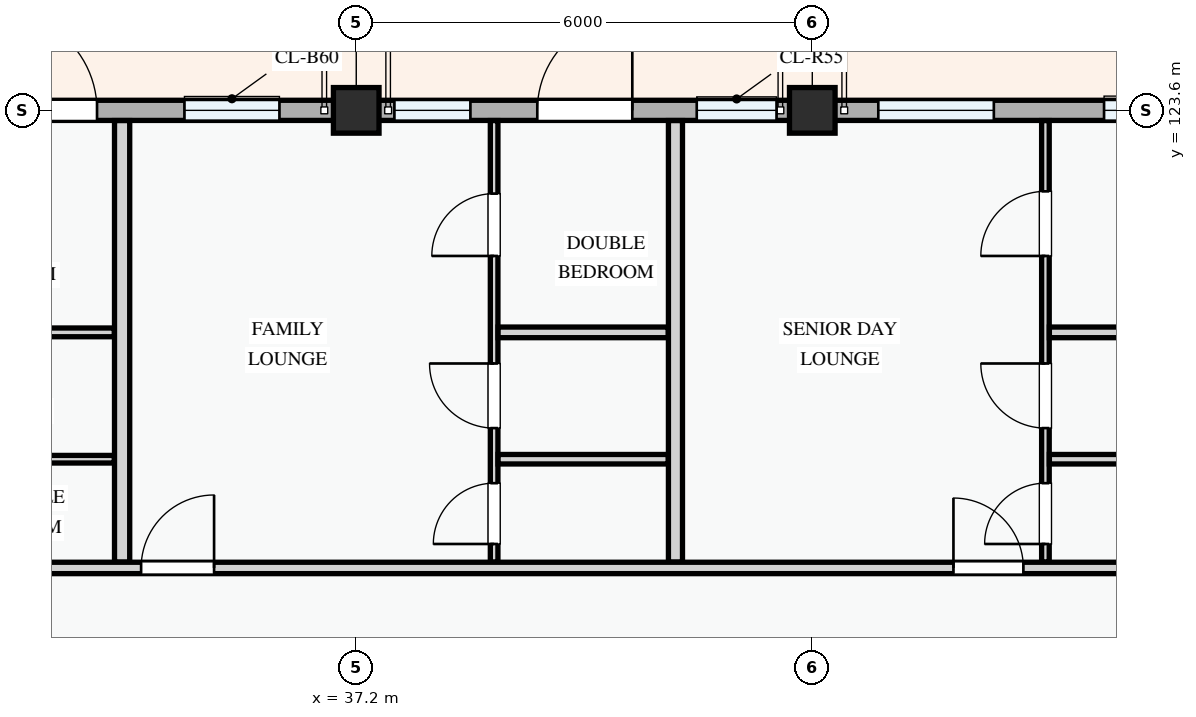
"""IFC4 building model, lengths in metres.
Left out: names, types, materials, properties, quantities, classifications, styles, units other than length and angle.
Written with IfcOpenShell. Run it as: python <this file> out.ifc"""

import sys

from ifc_helpers import new_model, si_unit, direction, frame, frame_2d, origin, origin_2d, place, context, subcontext, project, spatial, rectangle, extrude, element, fill, save


model = new_model("IFC4")
c1 = context("Model", 3, precision=1e-05, world=origin(), true_north=direction((0.0, 1.0)))
c2 = subcontext(c1, "Body", "Model", "MODEL_VIEW")
j1 = project(units=[si_unit("LENGTHUNIT", "METRE"), si_unit("PLANEANGLEUNIT", "RADIAN")], contexts=[c1])
p1 = place(None, origin())
s1 = spatial("IfcSite", under=j1, at=p1, CompositionType="ELEMENT")
p2 = place(p1, origin())
s2 = spatial("IfcBuilding", under=s1, at=p2, CompositionType="ELEMENT")
p3 = place(p2, frame((0.0, 0.0, 34.5)))
s3 = spatial("IfcBuildingStorey", under=s2, at=p3, CompositionType="ELEMENT", Elevation=34.5)
for number, where, z_axis, x_axis in (
    (1, (37.2, 123.6, 0.0), (0.0, 0.0, 1.0), (1.0, 0.0, 0.0)),
    (2, (43.2, 123.6, 0.0), (0.0, 0.0, 1.0), (1.0, 0.0, 0.0)),
):
    element("IfcColumn", number, at=place(p3, frame(where, z_axis=z_axis, x_axis=x_axis)), inside=s3, PredefinedType="COLUMN", context=c2, shape_type="SweptSolid", body=[
        extrude(rectangle(XDim=0.6, YDim=0.6, at=origin_2d()), origin(), (0.0, 0.0, 1.0), 3.3),
    ])
p4 = place(p3, frame((51.6, 123.6, 0.0), z_axis=(0.0, 0.0, 1.0), x_axis=(-1.0, 0.0, 0.0)))
e3 = element("IfcWall", 3, at=p4, inside=s3, PredefinedType="STANDARD", context=c2, shape_type="SweptSolid", body=[
    extrude(rectangle(XDim=8.4, YDim=0.265, at=frame_2d((4.2, 0.0))), origin(), (0.0, 0.0, 1.0), 2.345),
])
p5 = place(p4, frame((0.62, 0.0, 0.0)))
e4 = element("IfcOpeningElement", 4, at=p5, cuts=e3, PredefinedType="OPENING", context=c2, shape_type="SweptSolid", body=[
    extrude(rectangle(XDim=1.2, YDim=2.15, at=frame_2d((0.6, 1.075))), frame((0.0, 0.143, 0.0), z_axis=(0.0, -1.0, 0.0), x_axis=(1.0, 0.0, 0.0)), (0.0, 0.0, 1.0), 0.285),
])
p6 = place(p4, frame((2.641, 0.0, 0.78)))
e5 = element("IfcOpeningElement", 5, at=p6, cuts=e3, PredefinedType="OPENING", context=c2, shape_type="SweptSolid", body=[
    extrude(rectangle(XDim=1.92, YDim=1.44, at=frame_2d((0.96, 0.72))), frame((0.0, 0.143, 0.0), z_axis=(0.0, -1.0, 0.0), x_axis=(1.0, 0.0, 0.0)), (0.0, 0.0, 1.0), 0.285),
])
p7 = place(p4, frame((6.011, 0.0, 0.78)))
e6 = element("IfcOpeningElement", 6, at=p7, cuts=e3, PredefinedType="OPENING", context=c2, shape_type="SweptSolid", body=[
    extrude(rectangle(XDim=1.52, YDim=1.42, at=frame_2d((0.76, 0.71))), frame((0.0, 0.143, 0.0), z_axis=(0.0, -1.0, 0.0), x_axis=(1.0, 0.0, 0.0)), (0.0, 0.0, 1.0), 0.285),
])
p8 = place(p3, frame((43.2, 123.6, 0.0), z_axis=(0.0, 0.0, 1.0), x_axis=(-1.0, 0.0, 0.0)))
e7 = element("IfcWall", 7, at=p8, inside=s3, PredefinedType="STANDARD", context=c2, shape_type="SweptSolid", body=[
    extrude(rectangle(XDim=6.0, YDim=0.265, at=frame_2d((3.0, 0.0))), origin(), (0.0, 0.0, 1.0), 2.445),
])
p9 = place(p8, frame((2.368, 0.0, 0.0)))
e8 = element("IfcOpeningElement", 8, at=p9, cuts=e7, PredefinedType="OPENING", context=c2, shape_type="SweptSolid", body=[
    extrude(rectangle(XDim=1.25, YDim=2.2, at=frame_2d((0.625, 1.1))), frame((0.0, 0.143, 0.0), z_axis=(0.0, -1.0, 0.0), x_axis=(1.0, 0.0, 0.0)), (0.0, 0.0, 1.0), 0.285),
])
p10 = place(p8, frame((0.47, 0.0, 0.78)))
e9 = element("IfcOpeningElement", 9, at=p10, cuts=e7, PredefinedType="OPENING", context=c2, shape_type="SweptSolid", body=[
    extrude(rectangle(XDim=1.05, YDim=1.2, at=frame_2d((0.525, 0.6))), frame((0.0, 0.143, 0.0), z_axis=(0.0, -1.0, 0.0), x_axis=(1.0, 0.0, 0.0)), (0.0, 0.0, 1.0), 0.285),
])
p11 = place(p8, frame((4.498, 0.0, 0.78)))
e10 = element("IfcOpeningElement", 10, at=p11, cuts=e7, PredefinedType="OPENING", context=c2, shape_type="SweptSolid", body=[
    extrude(rectangle(XDim=1.0, YDim=1.25, at=frame_2d((0.5, 0.625))), frame((0.0, 0.143, 0.0), z_axis=(0.0, -1.0, 0.0), x_axis=(1.0, 0.0, 0.0)), (0.0, 0.0, 1.0), 0.285),
])
p12 = place(p3, frame((37.2, 123.6, 0.0), z_axis=(0.0, 0.0, 1.0), x_axis=(-1.0, 0.0, 0.0)))
e11 = element("IfcWall", 11, at=p12, inside=s3, PredefinedType="STANDARD", context=c2, shape_type="SweptSolid", body=[
    extrude(rectangle(XDim=8.4, YDim=0.265, at=frame_2d((4.2, 0.0))), origin(), (0.0, 0.0, 1.0), 2.345),
])
p13 = place(p12, frame((3.41, 0.0, 0.0)))
e12 = element("IfcOpeningElement", 12, at=p13, cuts=e11, PredefinedType="OPENING", context=c2, shape_type="SweptSolid", body=[
    extrude(rectangle(XDim=1.3, YDim=2.15, at=frame_2d((0.65, 1.075))), frame((0.0, 0.143, 0.0), z_axis=(0.0, -1.0, 0.0), x_axis=(1.0, 0.0, 0.0)), (0.0, 0.0, 1.0), 0.285),
])
p14 = place(p12, frame((1.01, 0.0, 0.78)))
e13 = element("IfcOpeningElement", 13, at=p14, cuts=e11, PredefinedType="OPENING", context=c2, shape_type="SweptSolid", body=[
    extrude(rectangle(XDim=1.25, YDim=1.45, at=frame_2d((0.625, 0.725))), frame((0.0, 0.143, 0.0), z_axis=(0.0, -1.0, 0.0), x_axis=(1.0, 0.0, 0.0)), (0.0, 0.0, 1.0), 0.285),
])
p15 = place(p12, frame((5.077, 0.0, 0.78)))
e14 = element("IfcOpeningElement", 14, at=p15, cuts=e11, PredefinedType="OPENING", context=c2, shape_type="SweptSolid", body=[
    extrude(rectangle(XDim=1.25, YDim=1.3, at=frame_2d((0.625, 0.65))), frame((0.0, 0.143, 0.0), z_axis=(0.0, -1.0, 0.0), x_axis=(1.0, 0.0, 0.0)), (0.0, 0.0, 1.0), 0.285),
])
p16 = place(p12, frame((6.927, 0.0, 0.78)))
e15 = element("IfcOpeningElement", 15, at=p16, cuts=e11, PredefinedType="OPENING", context=c2, shape_type="SweptSolid", body=[
    extrude(rectangle(XDim=1.0, YDim=1.25, at=frame_2d((0.5, 0.625))), frame((0.0, 0.143, 0.0), z_axis=(0.0, -1.0, 0.0), x_axis=(1.0, 0.0, 0.0)), (0.0, 0.0, 1.0), 0.285),
])
p17 = place(p3, frame((30.62, 120.679, 0.0), z_axis=(0.0, 0.0, 1.0), x_axis=(1.0, 0.0, 0.0)))
e16 = element("IfcWall", 16, at=p17, inside=s3, PredefinedType="PARTITIONING", context=c2, shape_type="SweptSolid", body=[
    extrude(rectangle(XDim=3.398, YDim=0.115, at=frame_2d((1.699, 0.0))), origin(), (0.0, 0.0, 1.0), 3.0),
])
p18 = place(p3, frame((30.62, 119.01, 0.0), z_axis=(0.0, 0.0, 1.0), x_axis=(1.0, 0.0, 0.0)))
e17 = element("IfcWall", 17, at=p18, inside=s3, PredefinedType="PARTITIONING", context=c2, shape_type="SweptSolid", body=[
    extrude(rectangle(XDim=3.398, YDim=0.1, at=frame_2d((1.699, 0.0))), origin(), (0.0, 0.0, 1.0), 3.0),
])
p19 = place(p3, frame((39.014, 117.657, 0.0), z_axis=(0.0, 0.0, 1.0), x_axis=(0.0, 1.0, 0.0)))
e18 = element("IfcWall", 18, at=p19, inside=s3, PredefinedType="PARTITIONING", context=c2, shape_type="SweptSolid", body=[
    extrude(rectangle(XDim=5.809, YDim=0.1, at=frame_2d((2.904, 0.0))), origin(), (0.0, 0.0, 1.0), 3.0),
])
p20 = place(p19, frame((0.238, 0.0, 0.0)))
e19 = element("IfcOpeningElement", 19, at=p20, cuts=e18, PredefinedType="OPENING", context=c2, shape_type="SweptSolid", body=[
    extrude(rectangle(XDim=0.8, YDim=2.1, at=frame_2d((0.4, 1.05))), frame((0.0, 0.06, 0.0), z_axis=(0.0, -1.0, 0.0), x_axis=(1.0, 0.0, 0.0)), (0.0, 0.0, 1.0), 0.12),
])
p21 = place(p19, frame((1.763, 0.0, 0.0)))
e20 = element("IfcOpeningElement", 20, at=p21, cuts=e18, PredefinedType="OPENING", context=c2, shape_type="SweptSolid", body=[
    extrude(rectangle(XDim=0.85, YDim=2.1, at=frame_2d((0.425, 1.05))), frame((0.0, 0.06, 0.0), z_axis=(0.0, -1.0, 0.0), x_axis=(1.0, 0.0, 0.0)), (0.0, 0.0, 1.0), 0.12),
])
p22 = place(p19, frame((4.028, 0.0, 0.0)))
e21 = element("IfcOpeningElement", 21, at=p22, cuts=e18, PredefinedType="OPENING", context=c2, shape_type="SweptSolid", body=[
    extrude(rectangle(XDim=0.82, YDim=2.08, at=frame_2d((0.41, 1.04))), frame((0.0, 0.06, 0.0), z_axis=(0.0, -1.0, 0.0), x_axis=(1.0, 0.0, 0.0)), (0.0, 0.0, 1.0), 0.12),
])
p23 = place(p3, frame((39.066, 120.679, 0.0), z_axis=(0.0, 0.0, 1.0), x_axis=(1.0, 0.0, 0.0)))
e22 = element("IfcWall", 22, at=p23, inside=s3, PredefinedType="PARTITIONING", context=c2, shape_type="SweptSolid", body=[
    extrude(rectangle(XDim=2.239, YDim=0.14, at=frame_2d((1.12, 0.0))), origin(), (0.0, 0.0, 1.0), 3.0),
])
p24 = place(p3, frame((39.066, 119.01, 0.0), z_axis=(0.0, 0.0, 1.0), x_axis=(1.0, 0.0, 0.0)))
e23 = element("IfcWall", 23, at=p24, inside=s3, PredefinedType="PARTITIONING", context=c2, shape_type="SweptSolid", body=[
    extrude(rectangle(XDim=2.239, YDim=0.125, at=frame_2d((1.12, 0.0))), origin(), (0.0, 0.0, 1.0), 3.0),
])
p25 = place(p3, frame((34.12, 117.657, 0.0), z_axis=(0.0, 0.0, 1.0), x_axis=(0.0, 1.0, 0.0)))
e24 = element("IfcWall", 24, at=p25, inside=s3, PredefinedType="PARTITIONING", context=c2, shape_type="SweptSolid", body=[
    extrude(rectangle(XDim=5.809, YDim=0.2, at=frame_2d((2.904, 0.0))), origin(), (0.0, 0.0, 1.0), 3.0),
])
p26 = place(p3, frame((46.267, 117.657, 0.0), z_axis=(0.0, 0.0, 1.0), x_axis=(0.0, 1.0, 0.0)))
e25 = element("IfcWall", 25, at=p26, inside=s3, PredefinedType="PARTITIONING", context=c2, shape_type="SweptSolid", body=[
    extrude(rectangle(XDim=5.809, YDim=0.1, at=frame_2d((2.904, 0.0))), origin(), (0.0, 0.0, 1.0), 3.0),
])
p27 = place(p26, frame((0.238, 0.0, 0.0)))
e26 = element("IfcOpeningElement", 26, at=p27, cuts=e25, PredefinedType="OPENING", context=c2, shape_type="SweptSolid", body=[
    extrude(rectangle(XDim=0.8, YDim=2.1, at=frame_2d((0.4, 1.05))), frame((0.0, 0.06, 0.0), z_axis=(0.0, -1.0, 0.0), x_axis=(1.0, 0.0, 0.0)), (0.0, 0.0, 1.0), 0.12),
])
p28 = place(p26, frame((1.763, 0.0, 0.0)))
e27 = element("IfcOpeningElement", 27, at=p28, cuts=e25, PredefinedType="OPENING", context=c2, shape_type="SweptSolid", body=[
    extrude(rectangle(XDim=0.85, YDim=2.1, at=frame_2d((0.425, 1.05))), frame((0.0, 0.06, 0.0), z_axis=(0.0, -1.0, 0.0), x_axis=(1.0, 0.0, 0.0)), (0.0, 0.0, 1.0), 0.12),
])
p29 = place(p26, frame((4.028, 0.0, 0.0)))
e28 = element("IfcOpeningElement", 28, at=p29, cuts=e25, PredefinedType="OPENING", context=c2, shape_type="SweptSolid", body=[
    extrude(rectangle(XDim=0.85, YDim=2.1, at=frame_2d((0.425, 1.05))), frame((0.0, 0.06, 0.0), z_axis=(0.0, -1.0, 0.0), x_axis=(1.0, 0.0, 0.0)), (0.0, 0.0, 1.0), 0.12),
])
p30 = place(p3, frame((46.319, 120.679, 0.0), z_axis=(0.0, 0.0, 1.0), x_axis=(1.0, 0.0, 0.0)))
e29 = element("IfcWall", 29, at=p30, inside=s3, PredefinedType="PARTITIONING", context=c2, shape_type="SweptSolid", body=[
    extrude(rectangle(XDim=5.146, YDim=0.14, at=frame_2d((2.573, 0.0))), origin(), (0.0, 0.0, 1.0), 3.0),
])
p31 = place(p3, frame((46.319, 119.01, 0.0), z_axis=(0.0, 0.0, 1.0), x_axis=(1.0, 0.0, 0.0)))
e30 = element("IfcWall", 30, at=p31, inside=s3, PredefinedType="PARTITIONING", context=c2, shape_type="SweptSolid", body=[
    extrude(rectangle(XDim=5.146, YDim=0.125, at=frame_2d((2.573, 0.0))), origin(), (0.0, 0.0, 1.0), 3.0),
])
p32 = place(p3, frame((41.4, 117.657, 0.0), z_axis=(0.0, 0.0, 1.0), x_axis=(0.0, 1.0, 0.0)))
e31 = element("IfcWall", 31, at=p32, inside=s3, PredefinedType="PARTITIONING", context=c2, shape_type="SweptSolid", body=[
    extrude(rectangle(XDim=5.809, YDim=0.185, at=frame_2d((2.904, 0.0))), origin(), (0.0, 0.0, 1.0), 3.0),
])
p33 = place(p3, frame((22.66, 117.58, 0.0), z_axis=(0.0, 0.0, 1.0), x_axis=(1.0, 0.0, 0.0)))
e32 = element("IfcWall", 32, at=p33, inside=s3, PredefinedType="PARTITIONING", context=c2, shape_type="SweptSolid", body=[
    extrude(rectangle(XDim=28.806, YDim=0.15, at=frame_2d((14.403, 0.0))), origin(), (0.0, 0.0, 1.0), 3.0),
])
p34 = place(p33, frame((2.74, 0.0, 0.0)))
e33 = element("IfcOpeningElement", 33, at=p34, cuts=e32, PredefinedType="OPENING", context=c2, shape_type="SweptSolid", body=[
    extrude(rectangle(XDim=0.92, YDim=2.1, at=frame_2d((0.46, 1.05))), frame((0.0, 0.085, 0.0), z_axis=(0.0, -1.0, 0.0), x_axis=(1.0, 0.0, 0.0)), (0.0, 0.0, 1.0), 0.17),
])
p35 = place(p33, frame((11.71, 0.0, 0.0)))
e34 = element("IfcOpeningElement", 34, at=p35, cuts=e32, PredefinedType="OPENING", context=c2, shape_type="SweptSolid", body=[
    extrude(rectangle(XDim=0.96, YDim=2.12, at=frame_2d((0.48, 1.06))), frame((0.0, 0.085, 0.0), z_axis=(0.0, -1.0, 0.0), x_axis=(1.0, 0.0, 0.0)), (0.0, 0.0, 1.0), 0.17),
])
p36 = place(p33, frame((22.397, 0.0, 0.0)))
e35 = element("IfcOpeningElement", 35, at=p36, cuts=e32, PredefinedType="OPENING", context=c2, shape_type="SweptSolid", body=[
    extrude(rectangle(XDim=0.92, YDim=2.1, at=frame_2d((0.46, 1.05))), frame((0.0, 0.085, 0.0), z_axis=(0.0, -1.0, 0.0), x_axis=(1.0, 0.0, 0.0)), (0.0, 0.0, 1.0), 0.17),
])
p37 = place(p6, origin())
e36 = element("IfcWindow", 36, at=p37, inside=s3, PartitioningType="DOUBLE_PANEL_VERTICAL", PredefinedType="WINDOW", context=c2, shape_type="SweptSolid", body=[
    extrude(rectangle(XDim=1.92, YDim=1.44, at=frame_2d((0.96, 0.72))), frame((0.0, 0.03, 0.0), z_axis=(0.0, -1.0, 0.0), x_axis=(1.0, 0.0, 0.0)), (0.0, 0.0, 1.0), 0.06),
])
fill(e5, e36)
p38 = place(p7, origin())
e37 = element("IfcWindow", 37, at=p38, inside=s3, PartitioningType="SINGLE_PANEL", PredefinedType="WINDOW", context=c2, shape_type="SweptSolid", body=[
    extrude(rectangle(XDim=1.52, YDim=1.42, at=frame_2d((0.76, 0.71))), frame((0.0, 0.03, 0.0), z_axis=(0.0, -1.0, 0.0), x_axis=(1.0, 0.0, 0.0)), (0.0, 0.0, 1.0), 0.06),
])
fill(e6, e37)
p39 = place(p9, frame((1.25, 0.0, 0.0), z_axis=(0.0, 0.0, 1.0), x_axis=(-1.0, 0.0, 0.0)))
e38 = element("IfcDoor", 38, at=p39, inside=s3, OperationType="SINGLE_SWING_RIGHT", PredefinedType="DOOR", context=c2, shape_type="SweptSolid", body=[
    extrude(rectangle(XDim=1.25, YDim=2.2, at=frame_2d((0.625, 1.1))), frame((0.0, 0.025, 0.0), z_axis=(0.0, -1.0, 0.0), x_axis=(1.0, 0.0, 0.0)), (0.0, 0.0, 1.0), 0.05),
])
fill(e8, e38)
p40 = place(p10, origin())
e39 = element("IfcWindow", 39, at=p40, inside=s3, PartitioningType="SINGLE_PANEL", PredefinedType="WINDOW", context=c2, shape_type="SweptSolid", body=[
    extrude(rectangle(XDim=1.05, YDim=1.2, at=frame_2d((0.525, 0.6))), frame((0.0, 0.03, 0.0), z_axis=(0.0, -1.0, 0.0), x_axis=(1.0, 0.0, 0.0)), (0.0, 0.0, 1.0), 0.06),
])
fill(e9, e39)
p41 = place(p11, origin())
e40 = element("IfcWindow", 40, at=p41, inside=s3, PartitioningType="SINGLE_PANEL", PredefinedType="WINDOW", context=c2, shape_type="SweptSolid", body=[
    extrude(rectangle(XDim=1.0, YDim=1.25, at=frame_2d((0.5, 0.625))), frame((0.0, 0.03, 0.0), z_axis=(0.0, -1.0, 0.0), x_axis=(1.0, 0.0, 0.0)), (0.0, 0.0, 1.0), 0.06),
])
fill(e10, e40)
p42 = place(p13, frame((1.3, 0.0, 0.0), z_axis=(0.0, 0.0, 1.0), x_axis=(-1.0, 0.0, 0.0)))
e41 = element("IfcDoor", 41, at=p42, inside=s3, OperationType="SINGLE_SWING_LEFT", PredefinedType="DOOR", context=c2, shape_type="SweptSolid", body=[
    extrude(rectangle(XDim=1.3, YDim=2.15, at=frame_2d((0.65, 1.075))), frame((0.0, 0.025, 0.0), z_axis=(0.0, -1.0, 0.0), x_axis=(1.0, 0.0, 0.0)), (0.0, 0.0, 1.0), 0.05),
])
fill(e12, e41)
p43 = place(p14, origin())
e42 = element("IfcWindow", 42, at=p43, inside=s3, PartitioningType="SINGLE_PANEL", PredefinedType="WINDOW", context=c2, shape_type="SweptSolid", body=[
    extrude(rectangle(XDim=1.25, YDim=1.45, at=frame_2d((0.625, 0.725))), frame((0.0, 0.03, 0.0), z_axis=(0.0, -1.0, 0.0), x_axis=(1.0, 0.0, 0.0)), (0.0, 0.0, 1.0), 0.06),
])
fill(e13, e42)
p44 = place(p20, origin())
e43 = element("IfcDoor", 43, at=p44, inside=s3, OperationType="SINGLE_SWING_LEFT", PredefinedType="DOOR", context=c2, shape_type="SweptSolid", body=[
    extrude(rectangle(XDim=0.8, YDim=2.1, at=frame_2d((0.4, 1.05))), frame((0.0, 0.025, 0.0), z_axis=(0.0, -1.0, 0.0), x_axis=(1.0, 0.0, 0.0)), (0.0, 0.0, 1.0), 0.05),
])
fill(e19, e43)
p45 = place(p21, origin())
e44 = element("IfcDoor", 44, at=p45, inside=s3, OperationType="SINGLE_SWING_RIGHT", PredefinedType="DOOR", context=c2, shape_type="SweptSolid", body=[
    extrude(rectangle(XDim=0.85, YDim=2.1, at=frame_2d((0.425, 1.05))), frame((0.0, 0.025, 0.0), z_axis=(0.0, -1.0, 0.0), x_axis=(1.0, 0.0, 0.0)), (0.0, 0.0, 1.0), 0.05),
])
fill(e20, e44)
p46 = place(p22, origin())
e45 = element("IfcDoor", 45, at=p46, inside=s3, OperationType="SINGLE_SWING_LEFT", PredefinedType="DOOR", context=c2, shape_type="SweptSolid", body=[
    extrude(rectangle(XDim=0.82, YDim=2.08, at=frame_2d((0.41, 1.04))), frame((0.0, 0.025, 0.0), z_axis=(0.0, -1.0, 0.0), x_axis=(1.0, 0.0, 0.0)), (0.0, 0.0, 1.0), 0.05),
])
fill(e21, e45)
p47 = place(p27, origin())
e46 = element("IfcDoor", 46, at=p47, inside=s3, OperationType="SINGLE_SWING_LEFT", PredefinedType="DOOR", context=c2, shape_type="SweptSolid", body=[
    extrude(rectangle(XDim=0.8, YDim=2.1, at=frame_2d((0.4, 1.05))), frame((0.0, 0.025, 0.0), z_axis=(0.0, -1.0, 0.0), x_axis=(1.0, 0.0, 0.0)), (0.0, 0.0, 1.0), 0.05),
])
fill(e26, e46)
p48 = place(p28, origin())
e47 = element("IfcDoor", 47, at=p48, inside=s3, OperationType="SINGLE_SWING_RIGHT", PredefinedType="DOOR", context=c2, shape_type="SweptSolid", body=[
    extrude(rectangle(XDim=0.85, YDim=2.1, at=frame_2d((0.425, 1.05))), frame((0.0, 0.025, 0.0), z_axis=(0.0, -1.0, 0.0), x_axis=(1.0, 0.0, 0.0)), (0.0, 0.0, 1.0), 0.05),
])
fill(e27, e47)
p49 = place(p29, origin())
e48 = element("IfcDoor", 48, at=p49, inside=s3, OperationType="SINGLE_SWING_LEFT", PredefinedType="DOOR", context=c2, shape_type="SweptSolid", body=[
    extrude(rectangle(XDim=0.85, YDim=2.1, at=frame_2d((0.425, 1.05))), frame((0.0, 0.025, 0.0), z_axis=(0.0, -1.0, 0.0), x_axis=(1.0, 0.0, 0.0)), (0.0, 0.0, 1.0), 0.05),
])
fill(e28, e48)
p50 = place(p35, origin())
e49 = element("IfcDoor", 49, at=p50, inside=s3, OperationType="SINGLE_SWING_RIGHT", PredefinedType="DOOR", context=c2, shape_type="SweptSolid", body=[
    extrude(rectangle(XDim=0.96, YDim=2.12, at=frame_2d((0.48, 1.06))), frame((0.0, 0.025, 0.0), z_axis=(0.0, -1.0, 0.0), x_axis=(1.0, 0.0, 0.0)), (0.0, 0.0, 1.0), 0.05),
])
fill(e34, e49)
p51 = place(p36, origin())
e50 = element("IfcDoor", 50, at=p51, inside=s3, OperationType="SINGLE_SWING_LEFT", PredefinedType="DOOR", context=c2, shape_type="SweptSolid", body=[
    extrude(rectangle(XDim=0.92, YDim=2.1, at=frame_2d((0.46, 1.05))), frame((0.0, 0.025, 0.0), z_axis=(0.0, -1.0, 0.0), x_axis=(1.0, 0.0, 0.0)), (0.0, 0.0, 1.0), 0.05),
])
fill(e35, e50)
save(model, sys.argv[1])
